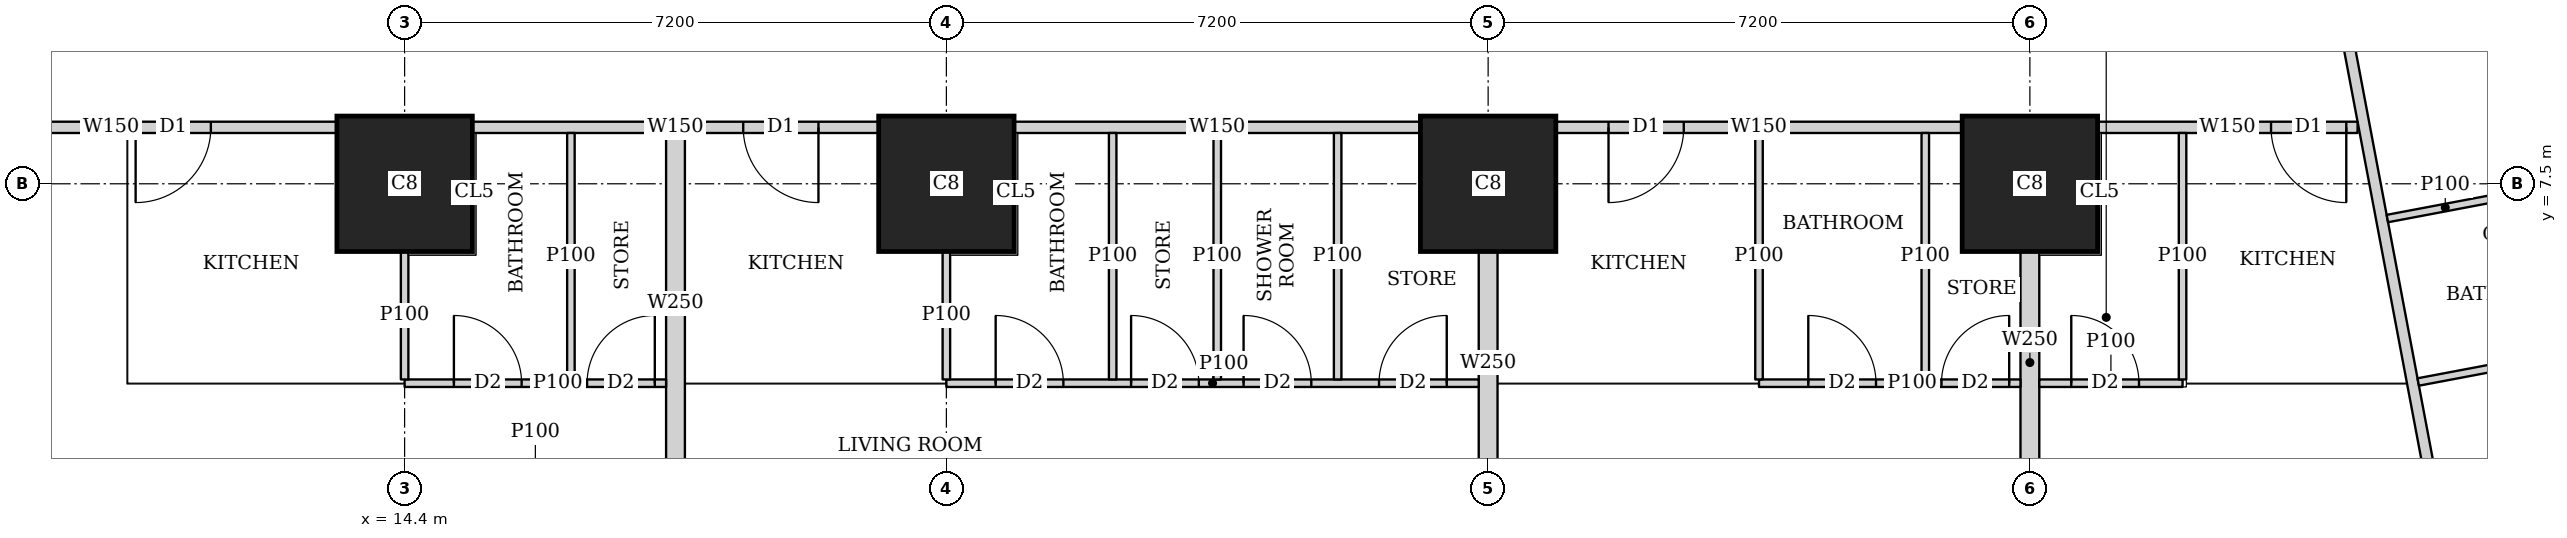
"""IFC4 building model, lengths in metres.
Left out: names, types, materials, properties, quantities, classifications, styles, units other than length and angle.
Written with IfcOpenShell. Run it as: python <this file> out.ifc"""

import sys

from ifc_helpers import new_model, si_unit, direction, frame, frame_2d, origin, origin_2d, place, context, subcontext, project, spatial, rectangle, extrude, element, fill, save


model = new_model("IFC4")
c1 = context("Model", 3, precision=1e-05, world=origin(), true_north=direction((0.0, 1.0)))
c2 = subcontext(c1, "Body", "Model", "MODEL_VIEW")
j1 = project(units=[si_unit("LENGTHUNIT", "METRE"), si_unit("PLANEANGLEUNIT", "RADIAN")], contexts=[c1])
p1 = place(None, origin())
s1 = spatial("IfcSite", under=j1, at=p1, CompositionType="ELEMENT")
p2 = place(p1, origin())
s2 = spatial("IfcBuilding", under=s1, at=p2, CompositionType="ELEMENT")
p3 = place(p2, frame((0.0, 0.0, 53.75)))
s3 = spatial("IfcBuildingStorey", under=s2, at=p3, CompositionType="ELEMENT", Elevation=53.75)
for number, where, z_axis, x_axis in (
    (1, (14.4, 7.5, 0.0), (0.0, 0.0, 1.0), (1.0, 0.0, 0.0)),
    (2, (21.6, 7.5, 0.0), (0.0, 0.0, 1.0), (1.0, 0.0, 0.0)),
    (3, (28.8, 7.5, 0.0), (0.0, 0.0, 1.0), (1.0, 0.0, 0.0)),
    (4, (36.0, 7.5, 0.0), (0.0, 0.0, 1.0), (1.0, 0.0, 0.0)),
):
    element("IfcColumn", number, at=place(p3, frame(where, z_axis=z_axis, x_axis=x_axis)), inside=s3, PredefinedType="COLUMN", context=c2, shape_type="SweptSolid", body=[
        extrude(rectangle(XDim=1.8, YDim=1.8, at=origin_2d()), origin(), (0.0, 0.0, 1.0), 3.75),
    ])
p4 = place(p3, frame((40.355, 8.25, 0.0), z_axis=(0.0, 0.0, 1.0), x_axis=(-1.0, 0.0, 0.0)))
e5 = element("IfcWall", 5, at=p4, inside=s3, PredefinedType="SOLIDWALL", context=c2, shape_type="SweptSolid", body=[
    extrude(rectangle(XDim=3.454, YDim=0.15, at=frame_2d((1.727, 0.0))), origin(), (0.0, 0.0, 1.0), 3.5),
])
p5 = place(p4, frame((0.15, 0.0, 0.0)))
e6 = element("IfcOpeningElement", 6, at=p5, cuts=e5, PredefinedType="OPENING", context=c2, shape_type="SweptSolid", body=[
    extrude(rectangle(XDim=1.0, YDim=2.1, at=frame_2d((0.5, 1.05))), frame((0.0, 0.085, 0.0), z_axis=(0.0, -1.0, 0.0), x_axis=(1.0, 0.0, 0.0)), (0.0, 0.0, 1.0), 0.17),
])
p6 = place(p3, frame((35.099, 8.25, 0.0), z_axis=(0.0, 0.0, 1.0), x_axis=(-1.0, 0.0, 0.0)))
e7 = element("IfcWall", 7, at=p6, inside=s3, PredefinedType="SOLIDWALL", context=c2, shape_type="SweptSolid", body=[
    extrude(rectangle(XDim=5.398, YDim=0.15, at=frame_2d((2.699, 0.0))), origin(), (0.0, 0.0, 1.0), 3.5),
])
p7 = place(p6, frame((3.699, 0.0, 0.0)))
e8 = element("IfcOpeningElement", 8, at=p7, cuts=e7, PredefinedType="OPENING", context=c2, shape_type="SweptSolid", body=[
    extrude(rectangle(XDim=1.0, YDim=2.1, at=frame_2d((0.5, 1.05))), frame((0.0, 0.085, 0.0), z_axis=(0.0, -1.0, 0.0), x_axis=(1.0, 0.0, 0.0)), (0.0, 0.0, 1.0), 0.17),
])
p8 = place(p3, frame((27.899, 8.25, 0.0), z_axis=(0.0, 0.0, 1.0), x_axis=(-1.0, 0.0, 0.0)))
e9 = element("IfcWall", 9, at=p8, inside=s3, PredefinedType="SOLIDWALL", context=c2, shape_type="SweptSolid", body=[
    extrude(rectangle(XDim=5.398, YDim=0.15, at=frame_2d((2.699, 0.0))), origin(), (0.0, 0.0, 1.0), 3.5),
])
p9 = place(p3, frame((20.699, 8.25, 0.0), z_axis=(0.0, 0.0, 1.0), x_axis=(-1.0, 0.0, 0.0)))
e10 = element("IfcWall", 10, at=p9, inside=s3, PredefinedType="SOLIDWALL", context=c2, shape_type="SweptSolid", body=[
    extrude(rectangle(XDim=5.398, YDim=0.15, at=frame_2d((2.699, 0.0))), origin(), (0.0, 0.0, 1.0), 3.5),
])
p10 = place(p9, frame((0.799, 0.0, 0.0)))
e11 = element("IfcOpeningElement", 11, at=p10, cuts=e10, PredefinedType="OPENING", context=c2, shape_type="SweptSolid", body=[
    extrude(rectangle(XDim=1.0, YDim=2.1, at=frame_2d((0.5, 1.05))), frame((0.0, 0.085, 0.0), z_axis=(0.0, -1.0, 0.0), x_axis=(1.0, 0.0, 0.0)), (0.0, 0.0, 1.0), 0.17),
])
p11 = place(p3, frame((13.499, 8.25, 0.0), z_axis=(0.0, 0.0, 1.0), x_axis=(-1.0, 0.0, 0.0)))
e12 = element("IfcWall", 12, at=p11, inside=s3, PredefinedType="SOLIDWALL", context=c2, shape_type="SweptSolid", body=[
    extrude(rectangle(XDim=5.399, YDim=0.15, at=frame_2d((2.699, 0.0))), origin(), (0.0, 0.0, 1.0), 3.5),
])
p12 = place(p11, frame((1.674, 0.0, 0.0)))
e13 = element("IfcOpeningElement", 13, at=p12, cuts=e12, PredefinedType="OPENING", context=c2, shape_type="SweptSolid", body=[
    extrude(rectangle(XDim=1.0, YDim=2.1, at=frame_2d((0.5, 1.05))), frame((0.0, 0.085, 0.0), z_axis=(0.0, -1.0, 0.0), x_axis=(1.0, 0.0, 0.0)), (0.0, 0.0, 1.0), 0.17),
])
p13 = place(p3, frame((35.094, 36.585, 0.0), z_axis=(0.0, 0.0, 1.0), x_axis=(0.185588860311, -0.982627485331, 0.0)))
e14 = element("IfcWall", 14, at=p13, inside=s3, PredefinedType="SOLIDWALL", context=c2, shape_type="SweptSolid", body=[
    extrude(rectangle(XDim=34.797, YDim=0.15, at=frame_2d((17.399, 0.0))), origin(), (0.0, 0.0, 1.0), 2.5),
])
p14 = place(p13, frame((9.828, 0.0, 0.0)))
e15 = element("IfcOpeningElement", 15, at=p14, cuts=e14, PredefinedType="OPENING", context=c2, shape_type="SweptSolid", body=[
    extrude(rectangle(XDim=1.0, YDim=2.1, at=frame_2d((0.5, 1.05))), frame((0.0, 0.085, 0.0), z_axis=(0.0, -1.0, 0.0), x_axis=(1.0, 0.0, 0.0)), (0.0, 0.0, 1.0), 0.17),
])
p15 = place(p13, frame((13.645, 0.0, 0.0)))
e16 = element("IfcOpeningElement", 16, at=p15, cuts=e14, PredefinedType="OPENING", context=c2, shape_type="SweptSolid", body=[
    extrude(rectangle(XDim=1.0, YDim=2.1, at=frame_2d((0.5, 1.05))), frame((0.0, 0.085, 0.0), z_axis=(0.0, -1.0, 0.0), x_axis=(1.0, 0.0, 0.0)), (0.0, 0.0, 1.0), 0.17),
])
p16 = place(p13, frame((25.9, 0.0, 0.0)))
e17 = element("IfcOpeningElement", 17, at=p16, cuts=e14, PredefinedType="OPENING", context=c2, shape_type="SweptSolid", body=[
    extrude(rectangle(XDim=1.0, YDim=2.1, at=frame_2d((0.5, 1.05))), frame((0.0, 0.085, 0.0), z_axis=(0.0, -1.0, 0.0), x_axis=(1.0, 0.0, 0.0)), (0.0, 0.0, 1.0), 0.17),
])
p17 = place(p3, frame((17.875, 4.85, 0.0), z_axis=(0.0, 0.0, 1.0), x_axis=(-1.0, 0.0, 0.0)))
e18 = element("IfcWall", 18, at=p17, inside=s3, PredefinedType="PARTITIONING", context=c2, shape_type="SweptSolid", body=[
    extrude(rectangle(XDim=3.475, YDim=0.1, at=frame_2d((1.738, 0.0))), origin(), (0.0, 0.0, 1.0), 3.5),
])
p18 = place(p17, frame((1.92, 0.0, 0.0)))
e19 = element("IfcOpeningElement", 19, at=p18, cuts=e18, PredefinedType="OPENING", context=c2, shape_type="SweptSolid", body=[
    extrude(rectangle(XDim=0.9, YDim=2.1, at=frame_2d((0.45, 1.05))), frame((0.0, 0.06, 0.0), z_axis=(0.0, -1.0, 0.0), x_axis=(1.0, 0.0, 0.0)), (0.0, 0.0, 1.0), 0.12),
])
p19 = place(p17, frame((0.15, 0.0, 0.0)))
e20 = element("IfcOpeningElement", 20, at=p19, cuts=e18, PredefinedType="OPENING", context=c2, shape_type="SweptSolid", body=[
    extrude(rectangle(XDim=0.9, YDim=2.1, at=frame_2d((0.45, 1.05))), frame((0.0, 0.06, 0.0), z_axis=(0.0, -1.0, 0.0), x_axis=(1.0, 0.0, 0.0)), (0.0, 0.0, 1.0), 0.12),
])
p20 = place(p3, frame((14.4, 4.9, 0.0), z_axis=(0.0, 0.0, 1.0), x_axis=(0.0, 1.0, 0.0)))
e21 = element("IfcWall", 21, at=p20, inside=s3, PredefinedType="PARTITIONING", context=c2, shape_type="SweptSolid", body=[
    extrude(rectangle(XDim=1.699, YDim=0.1, at=frame_2d((0.85, 0.0))), origin(), (0.0, 0.0, 1.0), 3.5),
])
p21 = place(p3, frame((16.61, 4.9, 0.0), z_axis=(0.0, 0.0, 1.0), x_axis=(0.0, 1.0, 0.0)))
e22 = element("IfcWall", 22, at=p21, inside=s3, PredefinedType="PARTITIONING", context=c2, shape_type="SweptSolid", body=[
    extrude(rectangle(XDim=3.275, YDim=0.1, at=frame_2d((1.638, 0.0))), origin(), (0.0, 0.0, 1.0), 3.5),
])
p22 = place(p3, frame((28.675, 4.85, 0.0), z_axis=(0.0, 0.0, 1.0), x_axis=(-1.0, 0.0, 0.0)))
e23 = element("IfcWall", 23, at=p22, inside=s3, PredefinedType="PARTITIONING", context=c2, shape_type="SweptSolid", body=[
    extrude(rectangle(XDim=7.075, YDim=0.1, at=frame_2d((3.538, 0.0))), origin(), (0.0, 0.0, 1.0), 3.5),
])
p23 = place(p22, frame((5.52, 0.0, 0.0)))
e24 = element("IfcOpeningElement", 24, at=p23, cuts=e23, PredefinedType="OPENING", context=c2, shape_type="SweptSolid", body=[
    extrude(rectangle(XDim=0.9, YDim=2.1, at=frame_2d((0.45, 1.05))), frame((0.0, 0.06, 0.0), z_axis=(0.0, -1.0, 0.0), x_axis=(1.0, 0.0, 0.0)), (0.0, 0.0, 1.0), 0.12),
])
p24 = place(p22, frame((2.225, 0.0, 0.0)))
e25 = element("IfcOpeningElement", 25, at=p24, cuts=e23, PredefinedType="OPENING", context=c2, shape_type="SweptSolid", body=[
    extrude(rectangle(XDim=0.9, YDim=2.1, at=frame_2d((0.45, 1.05))), frame((0.0, 0.06, 0.0), z_axis=(0.0, -1.0, 0.0), x_axis=(1.0, 0.0, 0.0)), (0.0, 0.0, 1.0), 0.12),
])
p25 = place(p22, frame((3.72, 0.0, 0.0)))
e26 = element("IfcOpeningElement", 26, at=p25, cuts=e23, PredefinedType="OPENING", context=c2, shape_type="SweptSolid", body=[
    extrude(rectangle(XDim=0.9, YDim=2.1, at=frame_2d((0.45, 1.05))), frame((0.0, 0.06, 0.0), z_axis=(0.0, -1.0, 0.0), x_axis=(1.0, 0.0, 0.0)), (0.0, 0.0, 1.0), 0.12),
])
p26 = place(p22, frame((0.425, 0.0, 0.0)))
e27 = element("IfcOpeningElement", 27, at=p26, cuts=e23, PredefinedType="OPENING", context=c2, shape_type="SweptSolid", body=[
    extrude(rectangle(XDim=0.9, YDim=2.1, at=frame_2d((0.45, 1.05))), frame((0.0, 0.06, 0.0), z_axis=(0.0, -1.0, 0.0), x_axis=(1.0, 0.0, 0.0)), (0.0, 0.0, 1.0), 0.12),
])
p27 = place(p3, frame((21.6, 4.9, 0.0), z_axis=(0.0, 0.0, 1.0), x_axis=(0.0, 1.0, 0.0)))
e28 = element("IfcWall", 28, at=p27, inside=s3, PredefinedType="PARTITIONING", context=c2, shape_type="SweptSolid", body=[
    extrude(rectangle(XDim=1.699, YDim=0.1, at=frame_2d((0.85, 0.0))), origin(), (0.0, 0.0, 1.0), 3.5),
])
for number, where, z_axis, x_axis in (
    (29, (25.2, 4.9, 0.0), (0.0, 0.0, 1.0), (0.0, 1.0, 0.0)),
    (30, (23.81, 4.9, 0.0), (0.0, 0.0, 1.0), (0.0, 1.0, 0.0)),
    (31, (26.8, 4.9, 0.0), (0.0, 0.0, 1.0), (0.0, 1.0, 0.0)),
):
    element("IfcWall", number, at=place(p3, frame(where, z_axis=z_axis, x_axis=x_axis)), inside=s3, PredefinedType="PARTITIONING", context=c2, shape_type="SweptSolid", body=[
        extrude(rectangle(XDim=3.275, YDim=0.1, at=frame_2d((1.638, 0.0))), origin(), (0.0, 0.0, 1.0), 3.5),
    ])
p28 = place(p3, frame((18.0, 3.65, 0.0), z_axis=(0.0, 0.0, 1.0), x_axis=(0.0, 1.0, 0.0)))
e32 = element("IfcWall", 32, at=p28, inside=s3, PredefinedType="SOLIDWALL", context=c2, shape_type="SweptSolid", body=[
    extrude(rectangle(XDim=4.525, YDim=0.25, at=frame_2d((2.263, 0.0))), origin(), (0.0, 0.0, 1.0), 3.5),
])
p29 = place(p3, frame((35.875, 4.85, 0.0), z_axis=(0.0, 0.0, 1.0), x_axis=(-1.0, 0.0, 0.0)))
e33 = element("IfcWall", 33, at=p29, inside=s3, PredefinedType="PARTITIONING", context=c2, shape_type="SweptSolid", body=[
    extrude(rectangle(XDim=3.475, YDim=0.1, at=frame_2d((1.738, 0.0))), origin(), (0.0, 0.0, 1.0), 3.5),
])
p30 = place(p29, frame((1.92, 0.0, 0.0)))
e34 = element("IfcOpeningElement", 34, at=p30, cuts=e33, PredefinedType="OPENING", context=c2, shape_type="SweptSolid", body=[
    extrude(rectangle(XDim=0.9, YDim=2.1, at=frame_2d((0.45, 1.05))), frame((0.0, 0.06, 0.0), z_axis=(0.0, -1.0, 0.0), x_axis=(1.0, 0.0, 0.0)), (0.0, 0.0, 1.0), 0.12),
])
p31 = place(p29, frame((0.15, 0.0, 0.0)))
e35 = element("IfcOpeningElement", 35, at=p31, cuts=e33, PredefinedType="OPENING", context=c2, shape_type="SweptSolid", body=[
    extrude(rectangle(XDim=0.9, YDim=2.1, at=frame_2d((0.45, 1.05))), frame((0.0, 0.06, 0.0), z_axis=(0.0, -1.0, 0.0), x_axis=(1.0, 0.0, 0.0)), (0.0, 0.0, 1.0), 0.12),
])
for number, where, z_axis, x_axis in (
    (36, (32.4, 4.9, 0.0), (0.0, 0.0, 1.0), (0.0, 1.0, 0.0)),
    (37, (34.61, 4.9, 0.0), (0.0, 0.0, 1.0), (0.0, 1.0, 0.0)),
):
    element("IfcWall", number, at=place(p3, frame(where, z_axis=z_axis, x_axis=x_axis)), inside=s3, PredefinedType="PARTITIONING", context=c2, shape_type="SweptSolid", body=[
        extrude(rectangle(XDim=3.275, YDim=0.1, at=frame_2d((1.638, 0.0))), origin(), (0.0, 0.0, 1.0), 3.5),
    ])
p32 = place(p3, frame((28.8, 3.65, 0.0), z_axis=(0.0, 0.0, 1.0), x_axis=(0.0, 1.0, 0.0)))
e38 = element("IfcWall", 38, at=p32, inside=s3, PredefinedType="SOLIDWALL", context=c2, shape_type="SweptSolid", body=[
    extrude(rectangle(XDim=2.949, YDim=0.25, at=frame_2d((1.475, 0.0))), origin(), (0.0, 0.0, 1.0), 3.5),
])
p33 = place(p3, frame((38.029, 4.85, 0.0), z_axis=(0.0, 0.0, 1.0), x_axis=(-1.0, 0.0, 0.0)))
e39 = element("IfcWall", 39, at=p33, inside=s3, PredefinedType="PARTITIONING", context=c2, shape_type="SweptSolid", body=[
    extrude(rectangle(XDim=1.904, YDim=0.1, at=frame_2d((0.952, 0.0))), origin(), (0.0, 0.0, 1.0), 3.5),
])
p34 = place(p33, frame((0.579, 0.0, 0.0)))
e40 = element("IfcOpeningElement", 40, at=p34, cuts=e39, PredefinedType="OPENING", context=c2, shape_type="SweptSolid", body=[
    extrude(rectangle(XDim=0.9, YDim=2.1, at=frame_2d((0.45, 1.05))), frame((0.0, 0.06, 0.0), z_axis=(0.0, -1.0, 0.0), x_axis=(1.0, 0.0, 0.0)), (0.0, 0.0, 1.0), 0.12),
])
p35 = place(p3, frame((38.029, 4.9, 0.0), z_axis=(0.0, 0.0, 1.0), x_axis=(0.0, 1.0, 0.0)))
e41 = element("IfcWall", 41, at=p35, inside=s3, PredefinedType="PARTITIONING", context=c2, shape_type="SweptSolid", body=[
    extrude(rectangle(XDim=3.275, YDim=0.1, at=frame_2d((1.638, 0.0))), origin(), (0.0, 0.0, 1.0), 3.5),
])
p36 = place(p3, frame((36.0, 3.65, 0.0), z_axis=(0.0, 0.0, 1.0), x_axis=(0.0, 1.0, 0.0)))
e42 = element("IfcWall", 42, at=p36, inside=s3, PredefinedType="SOLIDWALL", context=c2, shape_type="SweptSolid", body=[
    extrude(rectangle(XDim=2.949, YDim=0.25, at=frame_2d((1.475, 0.0))), origin(), (0.0, 0.0, 1.0), 3.5),
])
p37 = place(p3, frame((42.29, 7.329, 0.0), z_axis=(0.0, 0.0, 1.0), x_axis=(-0.98258870752, -0.18579405764, 0.0)))
e43 = element("IfcWall", 43, at=p37, inside=s3, PredefinedType="PARTITIONING", context=c2, shape_type="SweptSolid", body=[
    extrude(rectangle(XDim=1.566, YDim=0.1, at=frame_2d((0.783, 0.0))), origin(), (0.0, 0.0, 1.0), 3.5),
])
p38 = place(p3, frame((44.379, 5.474, 0.0), z_axis=(0.0, 0.0, 1.0), x_axis=(-0.982607026909, -0.185697147715, 0.0)))
e44 = element("IfcWall", 44, at=p38, inside=s3, PredefinedType="PARTITIONING", context=c2, shape_type="SweptSolid", body=[
    extrude(rectangle(XDim=3.275, YDim=0.1, at=frame_2d((1.637, 0.0))), origin(), (0.0, 0.0, 1.0), 3.5),
])
p39 = place(p18, origin())
e45 = element("IfcDoor", 45, at=p39, inside=s3, OperationType="SINGLE_SWING_LEFT", PredefinedType="DOOR", context=c2, shape_type="SweptSolid", body=[
    extrude(rectangle(XDim=0.9, YDim=2.1, at=frame_2d((0.45, 1.05))), frame((0.0, 0.025, 0.0), z_axis=(0.0, -1.0, 0.0), x_axis=(1.0, 0.0, 0.0)), (0.0, 0.0, 1.0), 0.05),
])
fill(e19, e45)
p40 = place(p19, origin())
e46 = element("IfcDoor", 46, at=p40, inside=s3, OperationType="SINGLE_SWING_RIGHT", PredefinedType="DOOR", context=c2, shape_type="SweptSolid", body=[
    extrude(rectangle(XDim=0.9, YDim=2.1, at=frame_2d((0.45, 1.05))), frame((0.0, 0.025, 0.0), z_axis=(0.0, -1.0, 0.0), x_axis=(1.0, 0.0, 0.0)), (0.0, 0.0, 1.0), 0.05),
])
fill(e20, e46)
p41 = place(p12, origin())
e47 = element("IfcDoor", 47, at=p41, inside=s3, OperationType="SINGLE_SWING_RIGHT", PredefinedType="DOOR", context=c2, shape_type="SweptSolid", body=[
    extrude(rectangle(XDim=1.0, YDim=2.1, at=frame_2d((0.5, 1.05))), frame((0.0, 0.025, 0.0), z_axis=(0.0, -1.0, 0.0), x_axis=(1.0, 0.0, 0.0)), (0.0, 0.0, 1.0), 0.05),
])
fill(e13, e47)
p42 = place(p23, origin())
e48 = element("IfcDoor", 48, at=p42, inside=s3, OperationType="SINGLE_SWING_LEFT", PredefinedType="DOOR", context=c2, shape_type="SweptSolid", body=[
    extrude(rectangle(XDim=0.9, YDim=2.1, at=frame_2d((0.45, 1.05))), frame((0.0, 0.025, 0.0), z_axis=(0.0, -1.0, 0.0), x_axis=(1.0, 0.0, 0.0)), (0.0, 0.0, 1.0), 0.05),
])
fill(e24, e48)
p43 = place(p24, origin())
e49 = element("IfcDoor", 49, at=p43, inside=s3, OperationType="SINGLE_SWING_LEFT", PredefinedType="DOOR", context=c2, shape_type="SweptSolid", body=[
    extrude(rectangle(XDim=0.9, YDim=2.1, at=frame_2d((0.45, 1.05))), frame((0.0, 0.025, 0.0), z_axis=(0.0, -1.0, 0.0), x_axis=(1.0, 0.0, 0.0)), (0.0, 0.0, 1.0), 0.05),
])
fill(e25, e49)
p44 = place(p25, origin())
e50 = element("IfcDoor", 50, at=p44, inside=s3, OperationType="SINGLE_SWING_LEFT", PredefinedType="DOOR", context=c2, shape_type="SweptSolid", body=[
    extrude(rectangle(XDim=0.9, YDim=2.1, at=frame_2d((0.45, 1.05))), frame((0.0, 0.025, 0.0), z_axis=(0.0, -1.0, 0.0), x_axis=(1.0, 0.0, 0.0)), (0.0, 0.0, 1.0), 0.05),
])
fill(e26, e50)
p45 = place(p26, origin())
e51 = element("IfcDoor", 51, at=p45, inside=s3, OperationType="SINGLE_SWING_RIGHT", PredefinedType="DOOR", context=c2, shape_type="SweptSolid", body=[
    extrude(rectangle(XDim=0.9, YDim=2.1, at=frame_2d((0.45, 1.05))), frame((0.0, 0.025, 0.0), z_axis=(0.0, -1.0, 0.0), x_axis=(1.0, 0.0, 0.0)), (0.0, 0.0, 1.0), 0.05),
])
fill(e27, e51)
p46 = place(p10, origin())
e52 = element("IfcDoor", 52, at=p46, inside=s3, OperationType="SINGLE_SWING_LEFT", PredefinedType="DOOR", context=c2, shape_type="SweptSolid", body=[
    extrude(rectangle(XDim=1.0, YDim=2.1, at=frame_2d((0.5, 1.05))), frame((0.0, 0.025, 0.0), z_axis=(0.0, -1.0, 0.0), x_axis=(1.0, 0.0, 0.0)), (0.0, 0.0, 1.0), 0.05),
])
fill(e11, e52)
p47 = place(p30, origin())
e53 = element("IfcDoor", 53, at=p47, inside=s3, OperationType="SINGLE_SWING_LEFT", PredefinedType="DOOR", context=c2, shape_type="SweptSolid", body=[
    extrude(rectangle(XDim=0.9, YDim=2.1, at=frame_2d((0.45, 1.05))), frame((0.0, 0.025, 0.0), z_axis=(0.0, -1.0, 0.0), x_axis=(1.0, 0.0, 0.0)), (0.0, 0.0, 1.0), 0.05),
])
fill(e34, e53)
p48 = place(p31, origin())
e54 = element("IfcDoor", 54, at=p48, inside=s3, OperationType="SINGLE_SWING_RIGHT", PredefinedType="DOOR", context=c2, shape_type="SweptSolid", body=[
    extrude(rectangle(XDim=0.9, YDim=2.1, at=frame_2d((0.45, 1.05))), frame((0.0, 0.025, 0.0), z_axis=(0.0, -1.0, 0.0), x_axis=(1.0, 0.0, 0.0)), (0.0, 0.0, 1.0), 0.05),
])
fill(e35, e54)
p49 = place(p7, origin())
e55 = element("IfcDoor", 55, at=p49, inside=s3, OperationType="SINGLE_SWING_RIGHT", PredefinedType="DOOR", context=c2, shape_type="SweptSolid", body=[
    extrude(rectangle(XDim=1.0, YDim=2.1, at=frame_2d((0.5, 1.05))), frame((0.0, 0.025, 0.0), z_axis=(0.0, -1.0, 0.0), x_axis=(1.0, 0.0, 0.0)), (0.0, 0.0, 1.0), 0.05),
])
fill(e8, e55)
p50 = place(p34, origin())
e56 = element("IfcDoor", 56, at=p50, inside=s3, OperationType="SINGLE_SWING_LEFT", PredefinedType="DOOR", context=c2, shape_type="SweptSolid", body=[
    extrude(rectangle(XDim=0.9, YDim=2.1, at=frame_2d((0.45, 1.05))), frame((0.0, 0.025, 0.0), z_axis=(0.0, -1.0, 0.0), x_axis=(1.0, 0.0, 0.0)), (0.0, 0.0, 1.0), 0.05),
])
fill(e40, e56)
p51 = place(p5, origin())
e57 = element("IfcDoor", 57, at=p51, inside=s3, OperationType="SINGLE_SWING_LEFT", PredefinedType="DOOR", context=c2, shape_type="SweptSolid", body=[
    extrude(rectangle(XDim=1.0, YDim=2.1, at=frame_2d((0.5, 1.05))), frame((0.0, 0.025, 0.0), z_axis=(0.0, -1.0, 0.0), x_axis=(1.0, 0.0, 0.0)), (0.0, 0.0, 1.0), 0.05),
])
fill(e6, e57)
save(model, sys.argv[1])
